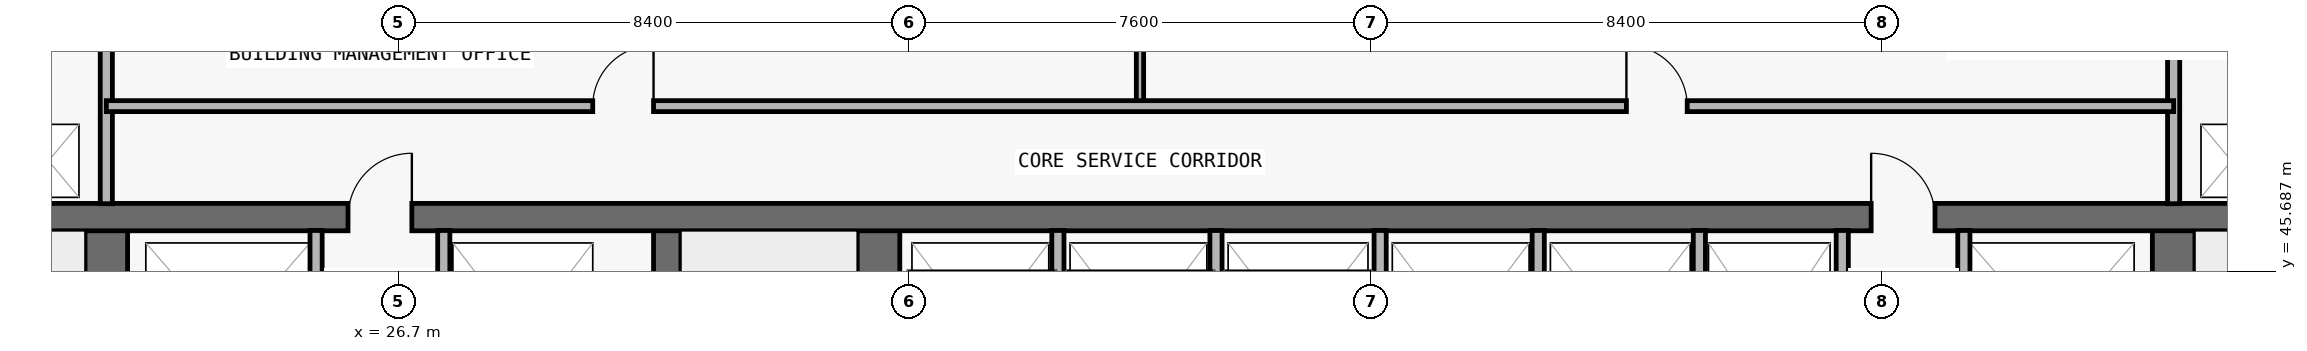
"""IFC4 building model, lengths in metres.
Left out: names, types, materials, properties, quantities, classifications, styles, units other than length and angle.
Written with IfcOpenShell. Run it as: python <this file> out.ifc"""

import sys

from ifc_helpers import new_model, si_unit, direction, frame, frame_2d, origin, place, context, subcontext, project, spatial, rectangle, extrude, element, fill, save


model = new_model("IFC4")
c1 = context("Model", 3, precision=1e-05, world=origin(), true_north=direction((0.0, 1.0)))
c2 = subcontext(c1, "Body", "Model", "MODEL_VIEW")
j1 = project(units=[si_unit("LENGTHUNIT", "METRE"), si_unit("PLANEANGLEUNIT", "RADIAN")], contexts=[c1])
p1 = place(None, origin())
s1 = spatial("IfcSite", under=j1, at=p1, CompositionType="ELEMENT")
p2 = place(p1, origin())
s2 = spatial("IfcBuilding", under=s1, at=p2, CompositionType="ELEMENT")
p3 = place(p2, frame((0.0, 0.0, 49.8)))
s3 = spatial("IfcBuildingStorey", under=s2, at=p3, CompositionType="ELEMENT", Elevation=49.8)
p4 = place(p3, frame((21.9, 36.9, 0.0), z_axis=(0.0, 0.0, 1.0), x_axis=(0.0, 1.0, 0.0)))
e1 = element("IfcWall", 1, at=p4, inside=s3, PredefinedType="SHEAR", context=c2, shape_type="SweptSolid", body=[
    extrude(rectangle(XDim=9.675, YDim=0.7, at=frame_2d((4.837, 0.0))), origin(), (0.0, 0.0, 1.0), 3.05),
])
p5 = place(p4, frame((0.65, 0.0, 0.0)))
e2 = element("IfcOpeningElement", 2, at=p5, cuts=e1, PredefinedType="OPENING", context=c2, shape_type="SweptSolid", body=[
    extrude(rectangle(XDim=1.1, YDim=2.15, at=frame_2d((0.55, 1.075))), frame((0.0, 0.36, 0.0), z_axis=(0.0, -1.0, 0.0), x_axis=(1.0, 0.0, 0.0)), (0.0, 0.0, 1.0), 0.72),
])
p6 = place(p3, frame((55.9, 36.9, 0.0), z_axis=(0.0, 0.0, 1.0), x_axis=(0.0, 1.0, 0.0)))
e3 = element("IfcWall", 3, at=p6, inside=s3, PredefinedType="SHEAR", context=c2, shape_type="SweptSolid", body=[
    extrude(rectangle(XDim=9.675, YDim=0.7, at=frame_2d((4.837, 0.0))), origin(), (0.0, 0.0, 1.0), 3.05),
])
p7 = place(p6, frame((0.65, 0.0, 0.0)))
e4 = element("IfcOpeningElement", 4, at=p7, cuts=e3, PredefinedType="OPENING", context=c2, shape_type="SweptSolid", body=[
    extrude(rectangle(XDim=1.1, YDim=2.15, at=frame_2d((0.55, 1.075))), frame((0.0, 0.36, 0.0), z_axis=(0.0, -1.0, 0.0), x_axis=(1.0, 0.0, 0.0)), (0.0, 0.0, 1.0), 0.72),
])
p8 = place(p3, frame((31.125, 36.9, 0.0), z_axis=(0.0, 0.0, 1.0), x_axis=(0.0, 1.0, 0.0)))
e5 = element("IfcWall", 5, at=p8, inside=s3, PredefinedType="SHEAR", context=c2, shape_type="SweptSolid", body=[
    extrude(rectangle(XDim=9.675, YDim=0.45, at=frame_2d((4.837, 0.0))), origin(), (0.0, 0.0, 1.0), 3.05),
])
p9 = place(p3, frame((34.6, 36.9, 0.0), z_axis=(0.0, 0.0, 1.0), x_axis=(0.0, 1.0, 0.0)))
e6 = element("IfcWall", 6, at=p9, inside=s3, PredefinedType="SHEAR", context=c2, shape_type="SweptSolid", body=[
    extrude(rectangle(XDim=9.675, YDim=0.7, at=frame_2d((4.837, 0.0))), origin(), (0.0, 0.0, 1.0), 3.05),
])
p10 = place(p3, frame((18.2, 46.575, 0.0), z_axis=(0.0, 0.0, 1.0), x_axis=(1.0, 0.0, 0.0)))
e7 = element("IfcWall", 7, at=p10, inside=s3, PredefinedType="SHEAR", context=c2, shape_type="SweptSolid", body=[
    extrude(rectangle(XDim=41.4, YDim=0.45, at=frame_2d((20.7, 0.0))), origin(), (0.0, 0.0, 1.0), 3.05),
])
p11 = place(p10, frame((7.675, 0.0, 0.0)))
e8 = element("IfcOpeningElement", 8, at=p11, cuts=e7, PredefinedType="OPENING", context=c2, shape_type="SweptSolid", body=[
    extrude(rectangle(XDim=1.05, YDim=2.15, at=frame_2d((0.525, 1.075))), frame((0.0, 0.235, 0.0), z_axis=(0.0, -1.0, 0.0), x_axis=(1.0, 0.0, 0.0)), (0.0, 0.0, 1.0), 0.47),
])
p12 = place(p10, frame((32.725, 0.0, 0.0)))
e9 = element("IfcOpeningElement", 9, at=p12, cuts=e7, PredefinedType="OPENING", context=c2, shape_type="SweptSolid", body=[
    extrude(rectangle(XDim=1.05, YDim=2.15, at=frame_2d((0.525, 1.075))), frame((0.0, 0.235, 0.0), z_axis=(0.0, -1.0, 0.0), x_axis=(1.0, 0.0, 0.0)), (0.0, 0.0, 1.0), 0.47),
])
p13 = place(p3, frame((21.9, 46.795, 0.0), z_axis=(0.0, 0.0, 1.0), x_axis=(0.0, 1.0, 0.0)))
e10 = element("IfcWall", 10, at=p13, inside=s3, PredefinedType="PARTITIONING", context=c2, shape_type="SweptSolid", body=[
    extrude(rectangle(XDim=3.06, YDim=0.2, at=frame_2d((1.53, 0.0))), origin(), (0.0, 0.0, 1.0), 3.05),
])
for number, where, z_axis, x_axis in (
    (11, (25.35, 43.17, 0.0), (0.0, 0.0, 1.0), (0.0, 1.0, 0.0)),
    (12, (27.45, 43.17, 0.0), (0.0, 0.0, 1.0), (0.0, 1.0, 0.0)),
    (13, (37.55, 43.17, 0.0), (0.0, 0.0, 1.0), (0.0, 1.0, 0.0)),
):
    element("IfcWall", number, at=place(p3, frame(where, z_axis=z_axis, x_axis=x_axis)), inside=s3, PredefinedType="PARTITIONING", context=c2, shape_type="SweptSolid", body=[
        extrude(rectangle(XDim=3.185, YDim=0.2, at=frame_2d((1.593, 0.0))), origin(), (0.0, 0.0, 1.0), 3.05),
    ])
p14 = place(p3, frame((38.9, 48.4, 0.0), z_axis=(0.0, 0.0, 1.0), x_axis=(0.0, 1.0, 0.0)))
e14 = element("IfcWall", 14, at=p14, inside=s3, PredefinedType="PARTITIONING", context=c2, shape_type="SweptSolid", body=[
    extrude(rectangle(XDim=1.455, YDim=0.12, at=frame_2d((0.728, 0.0))), origin(), (0.0, 0.0, 1.0), 3.05),
])
for number, where, z_axis, x_axis in (
    (15, (40.15, 43.17, 0.0), (0.0, 0.0, 1.0), (0.0, 1.0, 0.0)),
    (16, (42.85, 43.17, 0.0), (0.0, 0.0, 1.0), (0.0, 1.0, 0.0)),
    (17, (45.45, 43.17, 0.0), (0.0, 0.0, 1.0), (0.0, 1.0, 0.0)),
    (18, (48.1, 43.17, 0.0), (0.0, 0.0, 1.0), (0.0, 1.0, 0.0)),
    (19, (50.45, 43.17, 0.0), (0.0, 0.0, 1.0), (0.0, 1.0, 0.0)),
    (20, (52.45, 43.17, 0.0), (0.0, 0.0, 1.0), (0.0, 1.0, 0.0)),
):
    element("IfcWall", number, at=place(p3, frame(where, z_axis=z_axis, x_axis=x_axis)), inside=s3, PredefinedType="PARTITIONING", context=c2, shape_type="SweptSolid", body=[
        extrude(rectangle(XDim=3.185, YDim=0.2, at=frame_2d((1.593, 0.0))), origin(), (0.0, 0.0, 1.0), 3.05),
    ])
p15 = place(p3, frame((55.9, 46.795, 0.0), z_axis=(0.0, 0.0, 1.0), x_axis=(0.0, 1.0, 0.0)))
e21 = element("IfcWall", 21, at=p15, inside=s3, PredefinedType="PARTITIONING", context=c2, shape_type="SweptSolid", body=[
    extrude(rectangle(XDim=3.06, YDim=0.2, at=frame_2d((1.53, 0.0))), origin(), (0.0, 0.0, 1.0), 3.05),
])
p16 = place(p3, frame((21.9, 48.4, 0.0), z_axis=(0.0, 0.0, 1.0), x_axis=(1.0, 0.0, 0.0)))
e22 = element("IfcWall", 22, at=p16, inside=s3, PredefinedType="PARTITIONING", context=c2, shape_type="SweptSolid", body=[
    extrude(rectangle(XDim=34.0, YDim=0.18, at=frame_2d((17.0, 0.0))), origin(), (0.0, 0.0, 1.0), 3.05),
])
p17 = place(p16, frame((8.0, 0.0, 0.0)))
e23 = element("IfcOpeningElement", 23, at=p17, cuts=e22, PredefinedType="OPENING", context=c2, shape_type="SweptSolid", body=[
    extrude(rectangle(XDim=1.0, YDim=2.2, at=frame_2d((0.5, 1.1))), frame((0.0, 0.1, 0.0), z_axis=(0.0, -1.0, 0.0), x_axis=(1.0, 0.0, 0.0)), (0.0, 0.0, 1.0), 0.2),
])
p18 = place(p16, frame((25.0, 0.0, 0.0)))
e24 = element("IfcOpeningElement", 24, at=p18, cuts=e22, PredefinedType="OPENING", context=c2, shape_type="SweptSolid", body=[
    extrude(rectangle(XDim=1.0, YDim=2.2, at=frame_2d((0.5, 1.1))), frame((0.0, 0.1, 0.0), z_axis=(0.0, -1.0, 0.0), x_axis=(1.0, 0.0, 0.0)), (0.0, 0.0, 1.0), 0.2),
])
p19 = place(p11, origin())
e25 = element("IfcDoor", 25, at=p19, inside=s3, OperationType="SINGLE_SWING_RIGHT", PredefinedType="DOOR", context=c2, shape_type="SweptSolid", body=[
    extrude(rectangle(XDim=1.05, YDim=2.15, at=frame_2d((0.525, 1.075))), frame((0.0, 0.025, 0.0), z_axis=(0.0, -1.0, 0.0), x_axis=(1.0, 0.0, 0.0)), (0.0, 0.0, 1.0), 0.05),
])
fill(e8, e25)
p20 = place(p12, origin())
e26 = element("IfcDoor", 26, at=p20, inside=s3, OperationType="SINGLE_SWING_LEFT", PredefinedType="DOOR", context=c2, shape_type="SweptSolid", body=[
    extrude(rectangle(XDim=1.05, YDim=2.15, at=frame_2d((0.525, 1.075))), frame((0.0, 0.025, 0.0), z_axis=(0.0, -1.0, 0.0), x_axis=(1.0, 0.0, 0.0)), (0.0, 0.0, 1.0), 0.05),
])
fill(e9, e26)
p21 = place(p17, origin())
e27 = element("IfcDoor", 27, at=p21, inside=s3, OperationType="SINGLE_SWING_RIGHT", PredefinedType="DOOR", context=c2, shape_type="SweptSolid", body=[
    extrude(rectangle(XDim=1.0, YDim=2.2, at=frame_2d((0.5, 1.1))), frame((0.0, 0.025, 0.0), z_axis=(0.0, -1.0, 0.0), x_axis=(1.0, 0.0, 0.0)), (0.0, 0.0, 1.0), 0.05),
])
fill(e23, e27)
p22 = place(p18, origin())
e28 = element("IfcDoor", 28, at=p22, inside=s3, OperationType="SINGLE_SWING_LEFT", PredefinedType="DOOR", context=c2, shape_type="SweptSolid", body=[
    extrude(rectangle(XDim=1.0, YDim=2.2, at=frame_2d((0.5, 1.1))), frame((0.0, 0.025, 0.0), z_axis=(0.0, -1.0, 0.0), x_axis=(1.0, 0.0, 0.0)), (0.0, 0.0, 1.0), 0.05),
])
fill(e24, e28)
save(model, sys.argv[1])
